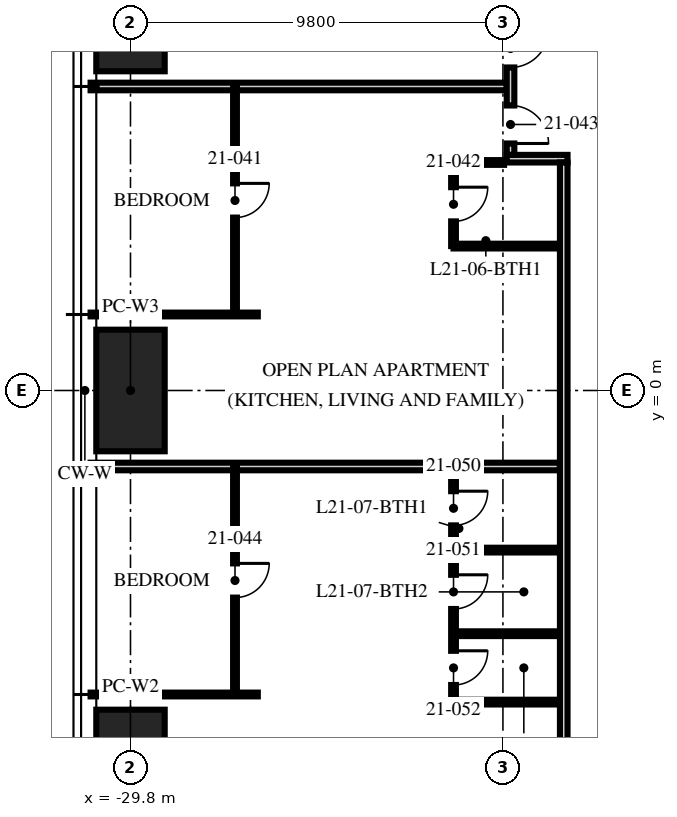
"""IFC4 building model, lengths in metres.
Left out: names, types, materials, properties, quantities, classifications, styles, units other than length and angle.
Written with IfcOpenShell. Run it as: python <this file> out.ifc"""

import sys

from ifc_helpers import new_model, si_unit, direction, frame, frame_2d, origin, origin_2d, place, context, subcontext, project, spatial, rectangle, hollow_rectangle, extrude, element, fill, save


model = new_model("IFC4")
c1 = context("Model", 3, precision=1e-05, world=origin(), true_north=direction((0.0, 1.0)))
c2 = subcontext(c1, "Body", "Model", "MODEL_VIEW")
j1 = project(units=[si_unit("LENGTHUNIT", "METRE"), si_unit("PLANEANGLEUNIT", "RADIAN")], contexts=[c1])
p1 = place(None, origin())
s1 = spatial("IfcSite", under=j1, at=p1, CompositionType="ELEMENT")
p2 = place(p1, origin())
s2 = spatial("IfcBuilding", under=s1, at=p2, CompositionType="ELEMENT")
p3 = place(p2, frame((0.0, 0.0, 84.75)))
s3 = spatial("IfcBuildingStorey", under=s2, at=p3, CompositionType="ELEMENT", Elevation=84.75)
for number, where, z_axis, x_axis in (
    (1, (-29.8, -10.0, 0.0), (0.0, 0.0, 1.0), (0.0, 1.0, 0.0)),
    (2, (-29.8, 0.0, 0.0), (0.0, 0.0, 1.0), (0.0, 1.0, 0.0)),
    (3, (-29.8, 10.0, 0.0), (0.0, 0.0, 1.0), (0.0, 1.0, 0.0)),
):
    element("IfcColumn", number, at=place(p3, frame(where, z_axis=z_axis, x_axis=x_axis)), inside=s3, PredefinedType="COLUMN", context=c2, shape_type="SweptSolid", body=[
        extrude(hollow_rectangle(XDim=3.2, YDim=1.8, WallThickness=0.2, at=origin_2d()), origin(), (0.0, 0.0, 1.0), 3.75),
    ])
p4 = place(p3, frame((-19.9, 8.0, 0.0), z_axis=(0.0, 0.0, 1.0), x_axis=(-1.0, 0.0, 0.0)))
e4 = element("IfcWall", 4, at=p4, inside=s3, PredefinedType="PARTITIONING", context=c2, shape_type="SweptSolid", body=[
    extrude(rectangle(XDim=10.95, YDim=0.2, at=frame_2d((5.475, 0.0))), origin(), (0.0, 0.0, 1.0), 2.71),
])
p5 = place(p3, frame((-26.45, 2.0, 0.0), z_axis=(0.0, 0.0, 1.0), x_axis=(-1.0, 0.0, 0.0)))
e5 = element("IfcWall", 5, at=p5, inside=s3, PredefinedType="PARTITIONING", context=c2, shape_type="SweptSolid", body=[
    extrude(rectangle(XDim=4.4, YDim=0.1, at=frame_2d((2.2, 0.0))), origin(), (0.0, 0.0, 1.0), 2.71),
])
p6 = place(p3, frame((-18.5, -2.0, 0.0), z_axis=(0.0, 0.0, 1.0), x_axis=(-1.0, 0.0, 0.0)))
e6 = element("IfcWall", 6, at=p6, inside=s3, PredefinedType="PARTITIONING", context=c2, shape_type="SweptSolid", body=[
    extrude(rectangle(XDim=12.35, YDim=0.2, at=frame_2d((6.175, 0.0))), origin(), (0.0, 0.0, 1.0), 2.71),
])
p7 = place(p3, frame((-26.45, -8.0, 0.0), z_axis=(0.0, 0.0, 1.0), x_axis=(-1.0, 0.0, 0.0)))
e7 = element("IfcWall", 7, at=p7, inside=s3, PredefinedType="PARTITIONING", context=c2, shape_type="SweptSolid", body=[
    extrude(rectangle(XDim=4.4, YDim=0.1, at=frame_2d((2.2, 0.0))), origin(), (0.0, 0.0, 1.0), 2.71),
])
p8 = place(p3, frame((-27.05, 8.0, 0.0), z_axis=(0.0, 0.0, 1.0), x_axis=(0.0, -1.0, 0.0)))
e8 = element("IfcWall", 8, at=p8, inside=s3, PredefinedType="PARTITIONING", context=c2, shape_type="SweptSolid", body=[
    extrude(rectangle(XDim=6.0, YDim=0.1, at=frame_2d((3.0, 0.0))), origin(), (0.0, 0.0, 1.0), 2.61),
])
p9 = place(p8, frame((2.55, 0.0, 0.0)))
e9 = element("IfcOpeningElement", 9, at=p9, cuts=e8, PredefinedType="OPENING", context=c2, shape_type="SweptSolid", body=[
    extrude(rectangle(XDim=0.9, YDim=2.1, at=frame_2d((0.45, 1.05))), frame((0.0, 0.06, 0.0), z_axis=(0.0, -1.0, 0.0), x_axis=(1.0, 0.0, 0.0)), (0.0, 0.0, 1.0), 0.12),
])
p10 = place(p3, frame((-21.3, 6.0, 0.0), z_axis=(0.0, 0.0, 1.0), x_axis=(0.0, -1.0, 0.0)))
e10 = element("IfcWall", 10, at=p10, inside=s3, PredefinedType="PARTITIONING", context=c2, shape_type="SweptSolid", body=[
    extrude(rectangle(XDim=2.2, YDim=0.125, at=frame_2d((1.1, 0.0))), origin(), (0.0, 0.0, 1.0), 2.61),
])
p11 = place(p10, frame((0.65, 0.0, 0.0)))
e11 = element("IfcOpeningElement", 11, at=p11, cuts=e10, PredefinedType="OPENING", context=c2, shape_type="SweptSolid", body=[
    extrude(rectangle(XDim=0.9, YDim=2.1, at=frame_2d((0.45, 1.05))), frame((0.0, 0.073, 0.0), z_axis=(0.0, -1.0, 0.0), x_axis=(1.0, 0.0, 0.0)), (0.0, 0.0, 1.0), 0.145),
])
p12 = place(p3, frame((-19.97, 6.0, 0.0), z_axis=(0.0, 0.0, 1.0), x_axis=(-1.0, 0.0, 0.0)))
e12 = element("IfcWall", 12, at=p12, inside=s3, PredefinedType="PARTITIONING", context=c2, shape_type="SweptSolid", body=[
    extrude(rectangle(XDim=1.33, YDim=0.125, at=frame_2d((0.665, 0.0))), origin(), (0.0, 0.0, 1.0), 3.5),
])
p13 = place(p3, frame((-18.5, 3.8, 0.0), z_axis=(0.0, 0.0, 1.0), x_axis=(-1.0, 0.0, 0.0)))
e13 = element("IfcWall", 13, at=p13, inside=s3, PredefinedType="PARTITIONING", context=c2, shape_type="SweptSolid", body=[
    extrude(rectangle(XDim=2.8, YDim=0.125, at=frame_2d((1.4, 0.0))), origin(), (0.0, 0.0, 1.0), 3.5),
])
p14 = place(p3, frame((-27.05, -2.0, 0.0), z_axis=(0.0, 0.0, 1.0), x_axis=(0.0, -1.0, 0.0)))
e14 = element("IfcWall", 14, at=p14, inside=s3, PredefinedType="PARTITIONING", context=c2, shape_type="SweptSolid", body=[
    extrude(rectangle(XDim=6.0, YDim=0.1, at=frame_2d((3.0, 0.0))), origin(), (0.0, 0.0, 1.0), 2.61),
])
p15 = place(p14, frame((2.55, 0.0, 0.0)))
e15 = element("IfcOpeningElement", 15, at=p15, cuts=e14, PredefinedType="OPENING", context=c2, shape_type="SweptSolid", body=[
    extrude(rectangle(XDim=0.9, YDim=2.1, at=frame_2d((0.45, 1.05))), frame((0.0, 0.06, 0.0), z_axis=(0.0, -1.0, 0.0), x_axis=(1.0, 0.0, 0.0)), (0.0, 0.0, 1.0), 0.12),
])
p16 = place(p3, frame((-21.3, -2.0, 0.0), z_axis=(0.0, 0.0, 1.0), x_axis=(0.0, -1.0, 0.0)))
e16 = element("IfcWall", 16, at=p16, inside=s3, PredefinedType="PARTITIONING", context=c2, shape_type="SweptSolid", body=[
    extrude(rectangle(XDim=6.2, YDim=0.125, at=frame_2d((3.1, 0.0))), origin(), (0.0, 0.0, 1.0), 2.61),
])
p17 = place(p16, frame((0.65, 0.0, 0.0)))
e17 = element("IfcOpeningElement", 17, at=p17, cuts=e16, PredefinedType="OPENING", context=c2, shape_type="SweptSolid", body=[
    extrude(rectangle(XDim=0.9, YDim=2.1, at=frame_2d((0.45, 1.05))), frame((0.0, 0.073, 0.0), z_axis=(0.0, -1.0, 0.0), x_axis=(1.0, 0.0, 0.0)), (0.0, 0.0, 1.0), 0.145),
])
p18 = place(p16, frame((2.85, 0.0, 0.0)))
e18 = element("IfcOpeningElement", 18, at=p18, cuts=e16, PredefinedType="OPENING", context=c2, shape_type="SweptSolid", body=[
    extrude(rectangle(XDim=0.9, YDim=2.1, at=frame_2d((0.45, 1.05))), frame((0.0, 0.073, 0.0), z_axis=(0.0, -1.0, 0.0), x_axis=(1.0, 0.0, 0.0)), (0.0, 0.0, 1.0), 0.145),
])
p19 = place(p16, frame((4.85, 0.0, 0.0)))
e19 = element("IfcOpeningElement", 19, at=p19, cuts=e16, PredefinedType="OPENING", context=c2, shape_type="SweptSolid", body=[
    extrude(rectangle(XDim=0.9, YDim=2.1, at=frame_2d((0.45, 1.05))), frame((0.0, 0.073, 0.0), z_axis=(0.0, -1.0, 0.0), x_axis=(1.0, 0.0, 0.0)), (0.0, 0.0, 1.0), 0.145),
])
for number, where, z_axis, x_axis in (
    (20, (-18.5, -4.2, 0.0), (0.0, 0.0, 1.0), (-1.0, 0.0, 0.0)),
    (21, (-18.5, -6.4, 0.0), (0.0, 0.0, 1.0), (-1.0, 0.0, 0.0)),
    (22, (-18.5, -8.2, 0.0), (0.0, 0.0, 1.0), (-1.0, 0.0, 0.0)),
):
    element("IfcWall", number, at=place(p3, frame(where, z_axis=z_axis, x_axis=x_axis)), inside=s3, PredefinedType="PARTITIONING", context=c2, shape_type="SweptSolid", body=[
        extrude(rectangle(XDim=2.8, YDim=0.125, at=frame_2d((1.4, 0.0))), origin(), (0.0, 0.0, 1.0), 3.5),
    ])
p20 = place(p3, frame((-18.3, 6.1, 0.0), z_axis=(0.0, 0.0, 1.0), x_axis=(-1.0, 0.0, 0.0)))
e23 = element("IfcWall", 23, at=p20, inside=s3, PredefinedType="PARTITIONING", context=c2, shape_type="SweptSolid", body=[
    extrude(rectangle(XDim=1.6, YDim=0.2, at=frame_2d((0.8, 0.0))), origin(), (0.0, 0.0, 1.0), 3.5),
])
p21 = place(p3, frame((-19.8, 9.8, 0.0), z_axis=(0.0, 0.0, 1.0), x_axis=(0.0, -1.0, 0.0)))
e24 = element("IfcWall", 24, at=p21, inside=s3, PredefinedType="PARTITIONING", context=c2, shape_type="SweptSolid", body=[
    extrude(rectangle(XDim=3.6, YDim=0.2, at=frame_2d((1.8, 0.0))), origin(), (0.0, 0.0, 1.0), 3.5),
])
p22 = place(p21, frame((0.3, 0.0, 0.0)))
e25 = element("IfcOpeningElement", 25, at=p22, cuts=e24, PredefinedType="OPENING", context=c2, shape_type="SweptSolid", body=[
    extrude(rectangle(XDim=1.0, YDim=2.2, at=frame_2d((0.5, 1.1))), frame((0.0, 0.11, 0.0), z_axis=(0.0, -1.0, 0.0), x_axis=(1.0, 0.0, 0.0)), (0.0, 0.0, 1.0), 0.22),
])
p23 = place(p21, frame((2.3, 0.0, 0.0)))
e26 = element("IfcOpeningElement", 26, at=p23, cuts=e24, PredefinedType="OPENING", context=c2, shape_type="SweptSolid", body=[
    extrude(rectangle(XDim=1.0, YDim=2.2, at=frame_2d((0.5, 1.1))), frame((0.0, 0.11, 0.0), z_axis=(0.0, -1.0, 0.0), x_axis=(1.0, 0.0, 0.0)), (0.0, 0.0, 1.0), 0.22),
])
p24 = place(p3, frame((-18.4, 6.0, 0.0), z_axis=(0.0, 0.0, 1.0), x_axis=(0.0, -1.0, 0.0)))
e27 = element("IfcWall", 27, at=p24, inside=s3, PredefinedType="PARTITIONING", context=c2, shape_type="SweptSolid", body=[
    extrude(rectangle(XDim=24.3, YDim=0.2, at=frame_2d((12.15, 0.0))), origin(), (0.0, 0.0, 1.0), 2.3),
])
p25 = place(p24, frame((22.52, 0.0, 0.0)))
e28 = element("IfcOpeningElement", 28, at=p25, cuts=e27, PredefinedType="OPENING", context=c2, shape_type="SweptSolid", body=[
    extrude(rectangle(XDim=1.0, YDim=2.2, at=frame_2d((0.5, 1.1))), frame((0.0, 0.11, 0.0), z_axis=(0.0, -1.0, 0.0), x_axis=(1.0, 0.0, 0.0)), (0.0, 0.0, 1.0), 0.22),
])
p26 = place(p22, origin())
e29 = element("IfcDoor", 29, at=p26, inside=s3, OperationType="SINGLE_SWING_LEFT", PredefinedType="DOOR", context=c2, shape_type="SweptSolid", body=[
    extrude(rectangle(XDim=1.0, YDim=2.2, at=frame_2d((0.5, 1.1))), frame((0.0, 0.025, 0.0), z_axis=(0.0, -1.0, 0.0), x_axis=(1.0, 0.0, 0.0)), (0.0, 0.0, 1.0), 0.05),
])
fill(e25, e29)
p27 = place(p9, origin())
e30 = element("IfcDoor", 30, at=p27, inside=s3, OperationType="SINGLE_SWING_LEFT", PredefinedType="DOOR", context=c2, shape_type="SweptSolid", body=[
    extrude(rectangle(XDim=0.9, YDim=2.1, at=frame_2d((0.45, 1.05))), frame((0.0, 0.025, 0.0), z_axis=(0.0, -1.0, 0.0), x_axis=(1.0, 0.0, 0.0)), (0.0, 0.0, 1.0), 0.05),
])
fill(e9, e30)
p28 = place(p11, origin())
e31 = element("IfcDoor", 31, at=p28, inside=s3, OperationType="SINGLE_SWING_LEFT", PredefinedType="DOOR", context=c2, shape_type="SweptSolid", body=[
    extrude(rectangle(XDim=0.9, YDim=2.1, at=frame_2d((0.45, 1.05))), frame((0.0, 0.025, 0.0), z_axis=(0.0, -1.0, 0.0), x_axis=(1.0, 0.0, 0.0)), (0.0, 0.0, 1.0), 0.05),
])
fill(e11, e31)
p29 = place(p23, origin())
e32 = element("IfcDoor", 32, at=p29, inside=s3, OperationType="SINGLE_SWING_RIGHT", PredefinedType="DOOR", context=c2, shape_type="SweptSolid", body=[
    extrude(rectangle(XDim=1.0, YDim=2.2, at=frame_2d((0.5, 1.1))), frame((0.0, 0.025, 0.0), z_axis=(0.0, -1.0, 0.0), x_axis=(1.0, 0.0, 0.0)), (0.0, 0.0, 1.0), 0.05),
])
fill(e26, e32)
p30 = place(p15, origin())
e33 = element("IfcDoor", 33, at=p30, inside=s3, OperationType="SINGLE_SWING_LEFT", PredefinedType="DOOR", context=c2, shape_type="SweptSolid", body=[
    extrude(rectangle(XDim=0.9, YDim=2.1, at=frame_2d((0.45, 1.05))), frame((0.0, 0.025, 0.0), z_axis=(0.0, -1.0, 0.0), x_axis=(1.0, 0.0, 0.0)), (0.0, 0.0, 1.0), 0.05),
])
fill(e15, e33)
p31 = place(p17, origin())
e34 = element("IfcDoor", 34, at=p31, inside=s3, OperationType="SINGLE_SWING_LEFT", PredefinedType="DOOR", context=c2, shape_type="SweptSolid", body=[
    extrude(rectangle(XDim=0.9, YDim=2.1, at=frame_2d((0.45, 1.05))), frame((0.0, 0.025, 0.0), z_axis=(0.0, -1.0, 0.0), x_axis=(1.0, 0.0, 0.0)), (0.0, 0.0, 1.0), 0.05),
])
fill(e17, e34)
p32 = place(p18, origin())
e35 = element("IfcDoor", 35, at=p32, inside=s3, OperationType="SINGLE_SWING_LEFT", PredefinedType="DOOR", context=c2, shape_type="SweptSolid", body=[
    extrude(rectangle(XDim=0.9, YDim=2.1, at=frame_2d((0.45, 1.05))), frame((0.0, 0.025, 0.0), z_axis=(0.0, -1.0, 0.0), x_axis=(1.0, 0.0, 0.0)), (0.0, 0.0, 1.0), 0.05),
])
fill(e18, e35)
p33 = place(p19, origin())
e36 = element("IfcDoor", 36, at=p33, inside=s3, OperationType="SINGLE_SWING_LEFT", PredefinedType="DOOR", context=c2, shape_type="SweptSolid", body=[
    extrude(rectangle(XDim=0.9, YDim=2.1, at=frame_2d((0.45, 1.05))), frame((0.0, 0.025, 0.0), z_axis=(0.0, -1.0, 0.0), x_axis=(1.0, 0.0, 0.0)), (0.0, 0.0, 1.0), 0.05),
])
fill(e19, e36)
save(model, sys.argv[1])
